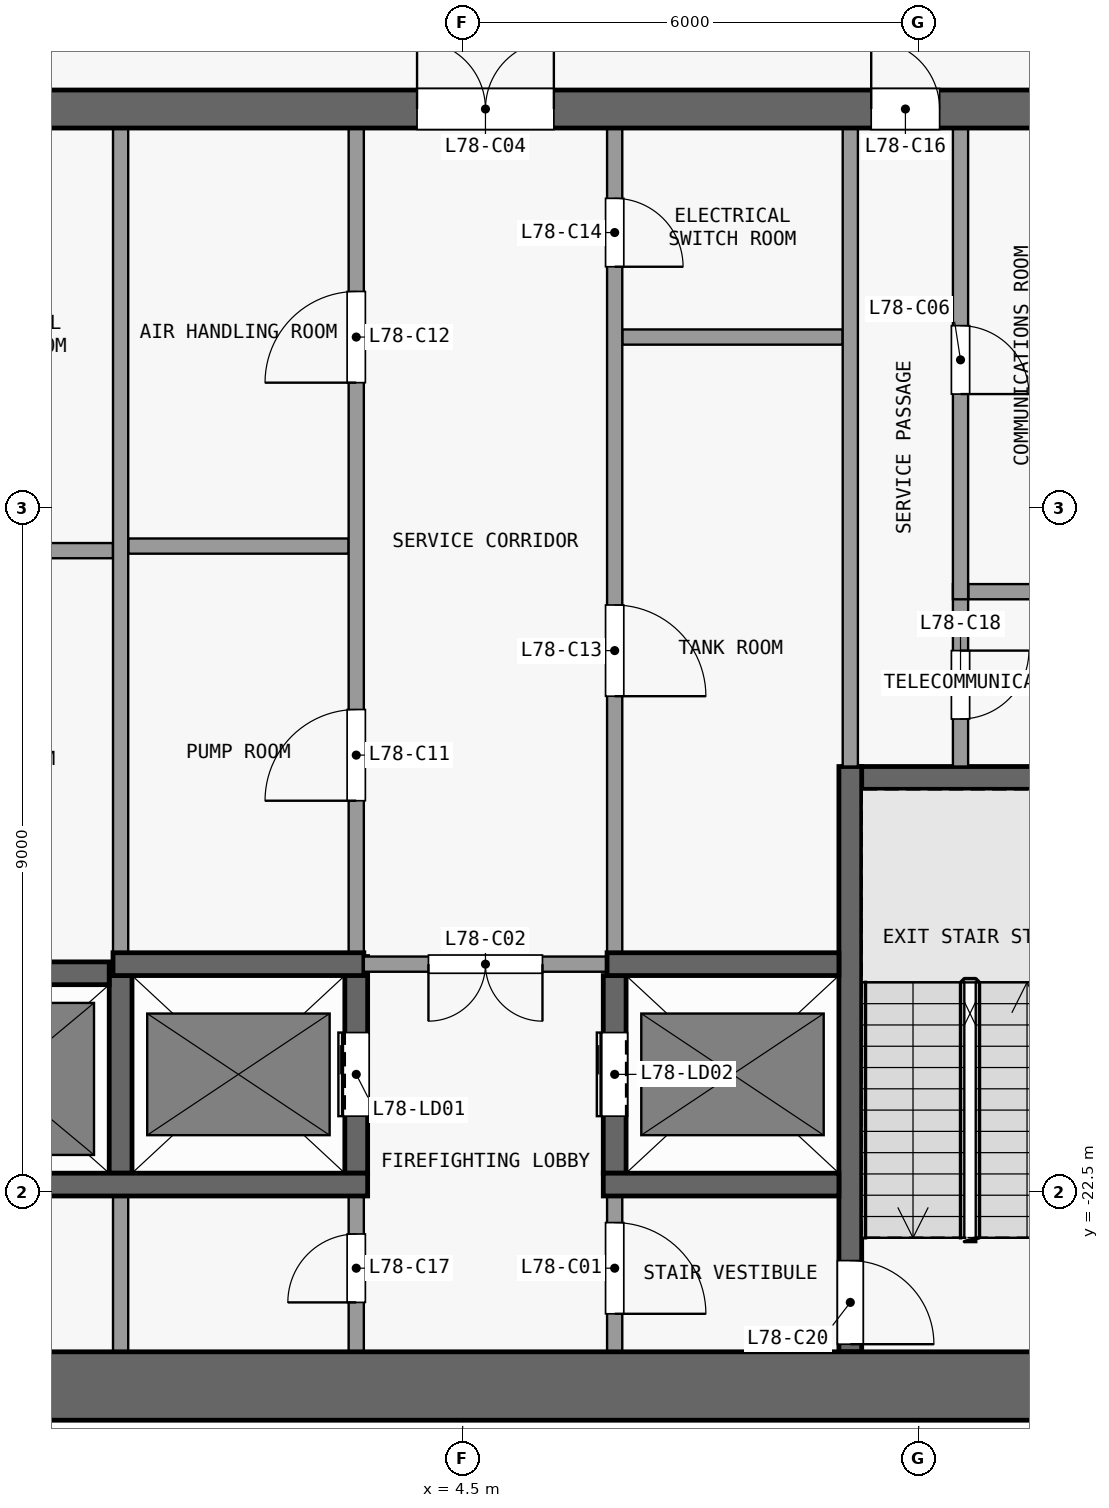
"""IFC4 building model, lengths in metres.
Left out: names, types, materials, properties, quantities, classifications, styles, units other than length and angle.
Written with IfcOpenShell. Run it as: python <this file> out.ifc"""

import sys

from ifc_helpers import new_model, si_unit, direction, frame, frame_2d, origin, place, context, subcontext, project, spatial, rectangle, extrude, element, fill, save


model = new_model("IFC4")
c1 = context("Model", 3, precision=1e-05, world=origin(), true_north=direction((0.0, 1.0)))
c2 = subcontext(c1, "Body", "Model", "MODEL_VIEW")
j1 = project(units=[si_unit("LENGTHUNIT", "METRE"), si_unit("PLANEANGLEUNIT", "RADIAN")], contexts=[c1])
p1 = place(None, origin())
s1 = spatial("IfcSite", under=j1, at=p1, CompositionType="ELEMENT")
p2 = place(p1, origin())
s2 = spatial("IfcBuilding", under=s1, at=p2, CompositionType="ELEMENT")
p3 = place(p2, frame((0.0, 0.0, 307.7)))
s3 = spatial("IfcBuildingStorey", under=s2, at=p3, CompositionType="ELEMENT", Elevation=307.7)
p4 = place(p3, frame((-13.1, -25.05, 0.0), z_axis=(0.0, 0.0, 1.0), x_axis=(1.0, 0.0, 0.0)))
e1 = element("IfcWall", 1, at=p4, inside=s3, PredefinedType="SHEAR", context=c2, shape_type="SweptSolid", body=[
    extrude(rectangle(XDim=26.2, YDim=0.9, at=frame_2d((13.1, 0.0))), origin(), (0.0, 0.0, 1.0), 4.1),
])
p5 = place(p3, frame((-13.1, -8.25, 0.0), z_axis=(0.0, 0.0, 1.0), x_axis=(1.0, 0.0, 0.0)))
e2 = element("IfcWall", 2, at=p5, inside=s3, PredefinedType="SHEAR", context=c2, shape_type="SweptSolid", body=[
    extrude(rectangle(XDim=26.2, YDim=0.5, at=frame_2d((13.1, 0.0))), origin(), (0.0, 0.0, 1.0), 4.1),
])
p6 = place(p5, frame((7.4, 0.0, 0.0)))
e3 = element("IfcOpeningElement", 3, at=p6, cuts=e2, PredefinedType="OPENING", context=c2, shape_type="SweptSolid", body=[
    extrude(rectangle(XDim=1.8, YDim=2.1, at=frame_2d((0.9, 1.05))), frame((0.0, 0.26, 0.0), z_axis=(0.0, -1.0, 0.0), x_axis=(1.0, 0.0, 0.0)), (0.0, 0.0, 1.0), 0.52),
])
p7 = place(p5, frame((17.0, 0.0, 0.0)))
e4 = element("IfcOpeningElement", 4, at=p7, cuts=e2, PredefinedType="OPENING", context=c2, shape_type="SweptSolid", body=[
    extrude(rectangle(XDim=1.8, YDim=2.1, at=frame_2d((0.9, 1.05))), frame((0.0, 0.26, 0.0), z_axis=(0.0, -1.0, 0.0), x_axis=(1.0, 0.0, 0.0)), (0.0, 0.0, 1.0), 0.52),
])
p8 = place(p5, frame((1.325, 0.0, 0.0)))
e5 = element("IfcOpeningElement", 5, at=p8, cuts=e2, PredefinedType="OPENING", context=c2, shape_type="SweptSolid", body=[
    extrude(rectangle(XDim=1.2, YDim=2.1, at=frame_2d((0.6, 1.05))), frame((0.0, 0.26, 0.0), z_axis=(0.0, -1.0, 0.0), x_axis=(1.0, 0.0, 0.0)), (0.0, 0.0, 1.0), 0.52),
])
p9 = place(p5, frame((22.975, 0.0, 0.0)))
e6 = element("IfcOpeningElement", 6, at=p9, cuts=e2, PredefinedType="OPENING", context=c2, shape_type="SweptSolid", body=[
    extrude(rectangle(XDim=0.9, YDim=2.1, at=frame_2d((0.45, 1.05))), frame((0.0, 0.26, 0.0), z_axis=(0.0, -1.0, 0.0), x_axis=(1.0, 0.0, 0.0)), (0.0, 0.0, 1.0), 0.52),
])
p10 = place(p3, frame((-3.25, -22.4, 0.0), z_axis=(0.0, 0.0, 1.0), x_axis=(1.0, 0.0, 0.0)))
e7 = element("IfcWall", 7, at=p10, inside=s3, PredefinedType="SHEAR", context=c2, shape_type="SweptSolid", body=[
    extrude(rectangle(XDim=6.5, YDim=0.3, at=frame_2d((3.25, 0.0))), origin(), (0.0, 0.0, 1.0), 4.1),
])
p11 = place(p3, frame((6.35, -22.4, 0.0), z_axis=(0.0, 0.0, 1.0), x_axis=(1.0, 0.0, 0.0)))
e8 = element("IfcWall", 8, at=p11, inside=s3, PredefinedType="SHEAR", context=c2, shape_type="SweptSolid", body=[
    extrude(rectangle(XDim=3.1, YDim=0.3, at=frame_2d((1.55, 0.0))), origin(), (0.0, 0.0, 1.0), 4.1),
])
p12 = place(p3, frame((-3.2, -19.62, 0.0), z_axis=(0.0, 0.0, 1.0), x_axis=(1.0, 0.0, 0.0)))
e9 = element("IfcWall", 9, at=p12, inside=s3, PredefinedType="SHEAR", context=c2, shape_type="SweptSolid", body=[
    extrude(rectangle(XDim=3.05, YDim=0.3, at=frame_2d((1.525, 0.0))), origin(), (0.0, 0.0, 1.0), 4.1),
])
p13 = place(p3, frame((-0.1, -19.5, 0.0), z_axis=(0.0, 0.0, 1.0), x_axis=(1.0, 0.0, 0.0)))
e10 = element("IfcWall", 10, at=p13, inside=s3, PredefinedType="SHEAR", context=c2, shape_type="SweptSolid", body=[
    extrude(rectangle(XDim=3.3, YDim=0.3, at=frame_2d((1.65, 0.0))), origin(), (0.0, 0.0, 1.0), 4.1),
])
p14 = place(p3, frame((6.4, -19.5, 0.0), z_axis=(0.0, 0.0, 1.0), x_axis=(-1.0, 0.0, 0.0)))
e11 = element("IfcWall", 11, at=p14, inside=s3, PredefinedType="PARTITIONING", context=c2, shape_type="SweptSolid", body=[
    extrude(rectangle(XDim=3.2, YDim=0.2, at=frame_2d((1.6, 0.0))), origin(), (0.0, 0.0, 1.0), 4.1),
])
p15 = place(p14, frame((0.85, 0.0, 0.0)))
e12 = element("IfcOpeningElement", 12, at=p15, cuts=e11, PredefinedType="OPENING", context=c2, shape_type="SweptSolid", body=[
    extrude(rectangle(XDim=1.5, YDim=2.1, at=frame_2d((0.75, 1.05))), frame((0.0, 0.11, 0.0), z_axis=(0.0, -1.0, 0.0), x_axis=(1.0, 0.0, 0.0)), (0.0, 0.0, 1.0), 0.22),
])
p16 = place(p3, frame((6.4, -19.5, 0.0), z_axis=(0.0, 0.0, 1.0), x_axis=(1.0, 0.0, 0.0)))
e13 = element("IfcWall", 13, at=p16, inside=s3, PredefinedType="SHEAR", context=c2, shape_type="SweptSolid", body=[
    extrude(rectangle(XDim=3.05, YDim=0.3, at=frame_2d((1.525, 0.0))), origin(), (0.0, 0.0, 1.0), 4.1),
])
p17 = place(p3, frame((9.5, -17.05, 0.0), z_axis=(0.0, 0.0, 1.0), x_axis=(1.0, 0.0, 0.0)))
e14 = element("IfcWall", 14, at=p17, inside=s3, PredefinedType="SHEAR", context=c2, shape_type="SweptSolid", body=[
    extrude(rectangle(XDim=3.1, YDim=0.3, at=frame_2d((1.55, 0.0))), origin(), (0.0, 0.0, 1.0), 4.1),
])
p18 = place(p3, frame((11.15, -14.6, 0.0), z_axis=(0.0, 0.0, 1.0), x_axis=(1.0, 0.0, 0.0)))
e15 = element("IfcWall", 15, at=p18, inside=s3, PredefinedType="PARTITIONING", context=c2, shape_type="SweptSolid", body=[
    extrude(rectangle(XDim=1.45, YDim=0.2, at=frame_2d((0.725, 0.0))), origin(), (0.0, 0.0, 1.0), 4.1),
])
for number, where, z_axis, x_axis in (
    (16, (-3.0, -14.06, 0.0), (0.0, 0.0, 1.0), (1.0, 0.0, 0.0)),
    (17, (0.1, -14.0, 0.0), (0.0, 0.0, 1.0), (1.0, 0.0, 0.0)),
    (18, (6.6, -11.25, 0.0), (0.0, 0.0, 1.0), (1.0, 0.0, 0.0)),
):
    element("IfcWall", number, at=place(p3, frame(where, z_axis=z_axis, x_axis=x_axis)), inside=s3, PredefinedType="PARTITIONING", context=c2, shape_type="SweptSolid", body=[
        extrude(rectangle(XDim=2.9, YDim=0.2, at=frame_2d((1.45, 0.0))), origin(), (0.0, 0.0, 1.0), 4.1),
    ])
p19 = place(p3, frame((0.0, -24.6, 0.0), z_axis=(0.0, 0.0, 1.0), x_axis=(0.0, 1.0, 0.0)))
e19 = element("IfcWall", 19, at=p19, inside=s3, PredefinedType="PARTITIONING", context=c2, shape_type="SweptSolid", body=[
    extrude(rectangle(XDim=2.05, YDim=0.2, at=frame_2d((1.025, 0.0))), origin(), (0.0, 0.0, 1.0), 4.1),
])
p20 = place(p3, frame((0.0, -22.25, 0.0), z_axis=(0.0, 0.0, 1.0), x_axis=(0.0, 1.0, 0.0)))
e20 = element("IfcWall", 20, at=p20, inside=s3, PredefinedType="SHEAR", context=c2, shape_type="SweptSolid", body=[
    extrude(rectangle(XDim=2.6, YDim=0.3, at=frame_2d((1.3, 0.0))), origin(), (0.0, 0.0, 1.0), 4.1),
])
p21 = place(p3, frame((0.0, -19.35, 0.0), z_axis=(0.0, 0.0, 1.0), x_axis=(0.0, 1.0, 0.0)))
e21 = element("IfcWall", 21, at=p21, inside=s3, PredefinedType="PARTITIONING", context=c2, shape_type="SweptSolid", body=[
    extrude(rectangle(XDim=10.85, YDim=0.2, at=frame_2d((5.425, 0.0))), origin(), (0.0, 0.0, 1.0), 4.1),
])
p22 = place(p3, frame((3.1, -24.6, 0.0), z_axis=(0.0, 0.0, 1.0), x_axis=(0.0, 1.0, 0.0)))
e22 = element("IfcWall", 22, at=p22, inside=s3, PredefinedType="PARTITIONING", context=c2, shape_type="SweptSolid", body=[
    extrude(rectangle(XDim=2.05, YDim=0.2, at=frame_2d((1.025, 0.0))), origin(), (0.0, 0.0, 1.0), 4.1),
])
p23 = place(p22, frame((0.65, 0.0, 0.0)))
e23 = element("IfcOpeningElement", 23, at=p23, cuts=e22, PredefinedType="OPENING", context=c2, shape_type="SweptSolid", body=[
    extrude(rectangle(XDim=0.9, YDim=2.1, at=frame_2d((0.45, 1.05))), frame((0.0, 0.11, 0.0), z_axis=(0.0, -1.0, 0.0), x_axis=(1.0, 0.0, 0.0)), (0.0, 0.0, 1.0), 0.22),
])
p24 = place(p3, frame((3.1, -22.25, 0.0), z_axis=(0.0, 0.0, 1.0), x_axis=(0.0, 1.0, 0.0)))
e24 = element("IfcWall", 24, at=p24, inside=s3, PredefinedType="SHEAR", context=c2, shape_type="SweptSolid", body=[
    extrude(rectangle(XDim=2.85, YDim=0.3, at=frame_2d((1.425, 0.0))), origin(), (0.0, 0.0, 1.0), 4.1),
])
p25 = place(p24, frame((0.75, 0.0, 0.0)))
e25 = element("IfcOpeningElement", 25, at=p25, cuts=e24, PredefinedType="OPENING", context=c2, shape_type="SweptSolid", body=[
    extrude(rectangle(XDim=1.1, YDim=2.1, at=frame_2d((0.55, 1.05))), frame((0.0, 0.16, 0.0), z_axis=(0.0, -1.0, 0.0), x_axis=(1.0, 0.0, 0.0)), (0.0, 0.0, 1.0), 0.32),
])
p26 = place(p3, frame((3.1, -19.6, 0.0), z_axis=(0.0, 0.0, 1.0), x_axis=(0.0, 1.0, 0.0)))
e26 = element("IfcWall", 26, at=p26, inside=s3, PredefinedType="PARTITIONING", context=c2, shape_type="SweptSolid", body=[
    extrude(rectangle(XDim=11.1, YDim=0.2, at=frame_2d((5.55, 0.0))), origin(), (0.0, 0.0, 1.0), 4.1),
])
p27 = place(p26, frame((2.25, 0.0, 0.0)))
e27 = element("IfcOpeningElement", 27, at=p27, cuts=e26, PredefinedType="OPENING", context=c2, shape_type="SweptSolid", body=[
    extrude(rectangle(XDim=1.2, YDim=2.1, at=frame_2d((0.6, 1.05))), frame((0.0, 0.11, 0.0), z_axis=(0.0, -1.0, 0.0), x_axis=(1.0, 0.0, 0.0)), (0.0, 0.0, 1.0), 0.22),
])
p28 = place(p26, frame((7.75, 0.0, 0.0)))
e28 = element("IfcOpeningElement", 28, at=p28, cuts=e26, PredefinedType="OPENING", context=c2, shape_type="SweptSolid", body=[
    extrude(rectangle(XDim=1.2, YDim=2.1, at=frame_2d((0.6, 1.05))), frame((0.0, 0.11, 0.0), z_axis=(0.0, -1.0, 0.0), x_axis=(1.0, 0.0, 0.0)), (0.0, 0.0, 1.0), 0.22),
])
p29 = place(p3, frame((6.5, -22.55, 0.0), z_axis=(0.0, 0.0, 1.0), x_axis=(0.0, -1.0, 0.0)))
e29 = element("IfcWall", 29, at=p29, inside=s3, PredefinedType="PARTITIONING", context=c2, shape_type="SweptSolid", body=[
    extrude(rectangle(XDim=2.05, YDim=0.2, at=frame_2d((1.025, 0.0))), origin(), (0.0, 0.0, 1.0), 4.1),
])
p30 = place(p29, frame((0.35, 0.0, 0.0)))
e30 = element("IfcOpeningElement", 30, at=p30, cuts=e29, PredefinedType="OPENING", context=c2, shape_type="SweptSolid", body=[
    extrude(rectangle(XDim=1.2, YDim=2.1, at=frame_2d((0.6, 1.05))), frame((0.0, 0.11, 0.0), z_axis=(0.0, -1.0, 0.0), x_axis=(1.0, 0.0, 0.0)), (0.0, 0.0, 1.0), 0.22),
])
p31 = place(p3, frame((6.5, -22.25, 0.0), z_axis=(0.0, 0.0, 1.0), x_axis=(0.0, 1.0, 0.0)))
e31 = element("IfcWall", 31, at=p31, inside=s3, PredefinedType="SHEAR", context=c2, shape_type="SweptSolid", body=[
    extrude(rectangle(XDim=2.6, YDim=0.3, at=frame_2d((1.3, 0.0))), origin(), (0.0, 0.0, 1.0), 4.1),
])
p32 = place(p31, frame((0.75, 0.0, 0.0)))
e32 = element("IfcOpeningElement", 32, at=p32, cuts=e31, PredefinedType="OPENING", context=c2, shape_type="SweptSolid", body=[
    extrude(rectangle(XDim=1.1, YDim=2.1, at=frame_2d((0.55, 1.05))), frame((0.0, 0.16, 0.0), z_axis=(0.0, -1.0, 0.0), x_axis=(1.0, 0.0, 0.0)), (0.0, 0.0, 1.0), 0.32),
])
p33 = place(p3, frame((6.5, -8.5, 0.0), z_axis=(0.0, 0.0, 1.0), x_axis=(0.0, -1.0, 0.0)))
e33 = element("IfcWall", 33, at=p33, inside=s3, PredefinedType="PARTITIONING", context=c2, shape_type="SweptSolid", body=[
    extrude(rectangle(XDim=10.85, YDim=0.2, at=frame_2d((5.425, 0.0))), origin(), (0.0, 0.0, 1.0), 4.1),
])
p34 = place(p33, frame((6.275, 0.0, 0.0)))
e34 = element("IfcOpeningElement", 34, at=p34, cuts=e33, PredefinedType="OPENING", context=c2, shape_type="SweptSolid", body=[
    extrude(rectangle(XDim=1.2, YDim=2.1, at=frame_2d((0.6, 1.05))), frame((0.0, 0.11, 0.0), z_axis=(0.0, -1.0, 0.0), x_axis=(1.0, 0.0, 0.0)), (0.0, 0.0, 1.0), 0.22),
])
p35 = place(p33, frame((0.925, 0.0, 0.0)))
e35 = element("IfcOpeningElement", 35, at=p35, cuts=e33, PredefinedType="OPENING", context=c2, shape_type="SweptSolid", body=[
    extrude(rectangle(XDim=0.9, YDim=2.1, at=frame_2d((0.45, 1.05))), frame((0.0, 0.11, 0.0), z_axis=(0.0, -1.0, 0.0), x_axis=(1.0, 0.0, 0.0)), (0.0, 0.0, 1.0), 0.22),
])
p36 = place(p3, frame((9.6, -16.9, 0.0), z_axis=(0.0, 0.0, 1.0), x_axis=(0.0, -1.0, 0.0)))
e36 = element("IfcWall", 36, at=p36, inside=s3, PredefinedType="SHEAR", context=c2, shape_type="SweptSolid", body=[
    extrude(rectangle(XDim=7.7, YDim=0.3, at=frame_2d((3.85, 0.0))), origin(), (0.0, 0.0, 1.0), 4.1),
])
p37 = place(p36, frame((6.5, 0.0, 0.0)))
e37 = element("IfcOpeningElement", 37, at=p37, cuts=e36, PredefinedType="OPENING", context=c2, shape_type="SweptSolid", body=[
    extrude(rectangle(XDim=1.1, YDim=2.1, at=frame_2d((0.55, 1.05))), frame((0.0, 0.16, 0.0), z_axis=(0.0, -1.0, 0.0), x_axis=(1.0, 0.0, 0.0)), (0.0, 0.0, 1.0), 0.32),
])
p38 = place(p3, frame((9.6, -16.9, 0.0), z_axis=(0.0, 0.0, 1.0), x_axis=(0.0, 1.0, 0.0)))
e38 = element("IfcWall", 38, at=p38, inside=s3, PredefinedType="PARTITIONING", context=c2, shape_type="SweptSolid", body=[
    extrude(rectangle(XDim=8.4, YDim=0.2, at=frame_2d((4.2, 0.0))), origin(), (0.0, 0.0, 1.0), 4.1),
])
p39 = place(p3, frame((11.05, -14.5, 0.0), z_axis=(0.0, 0.0, 1.0), x_axis=(0.0, -1.0, 0.0)))
e39 = element("IfcWall", 39, at=p39, inside=s3, PredefinedType="PARTITIONING", context=c2, shape_type="SweptSolid", body=[
    extrude(rectangle(XDim=2.4, YDim=0.2, at=frame_2d((1.2, 0.0))), origin(), (0.0, 0.0, 1.0), 4.1),
])
p40 = place(p39, frame((0.875, 0.0, 0.0)))
e40 = element("IfcOpeningElement", 40, at=p40, cuts=e39, PredefinedType="OPENING", context=c2, shape_type="SweptSolid", body=[
    extrude(rectangle(XDim=0.9, YDim=2.1, at=frame_2d((0.45, 1.05))), frame((0.0, 0.11, 0.0), z_axis=(0.0, -1.0, 0.0), x_axis=(1.0, 0.0, 0.0)), (0.0, 0.0, 1.0), 0.22),
])
p41 = place(p3, frame((11.05, -8.5, 0.0), z_axis=(0.0, 0.0, 1.0), x_axis=(0.0, -1.0, 0.0)))
e41 = element("IfcWall", 41, at=p41, inside=s3, PredefinedType="PARTITIONING", context=c2, shape_type="SweptSolid", body=[
    extrude(rectangle(XDim=6.2, YDim=0.2, at=frame_2d((3.1, 0.0))), origin(), (0.0, 0.0, 1.0), 4.1),
])
p42 = place(p41, frame((2.6, 0.0, 0.0)))
e42 = element("IfcOpeningElement", 42, at=p42, cuts=e41, PredefinedType="OPENING", context=c2, shape_type="SweptSolid", body=[
    extrude(rectangle(XDim=0.9, YDim=2.1, at=frame_2d((0.45, 1.05))), frame((0.0, 0.11, 0.0), z_axis=(0.0, -1.0, 0.0), x_axis=(1.0, 0.0, 0.0)), (0.0, 0.0, 1.0), 0.22),
])
p43 = place(p25, origin())
e43 = element("IfcDoor", 43, at=p43, inside=s3, OperationType="DOUBLE_DOOR_SLIDING", PredefinedType="DOOR", context=c2, shape_type="SweptSolid", body=[
    extrude(rectangle(XDim=1.1, YDim=2.1, at=frame_2d((0.55, 1.05))), frame((0.0, 0.025, 0.0), z_axis=(0.0, -1.0, 0.0), x_axis=(1.0, 0.0, 0.0)), (0.0, 0.0, 1.0), 0.05),
])
fill(e25, e43)
p44 = place(p32, origin())
e44 = element("IfcDoor", 44, at=p44, inside=s3, OperationType="DOUBLE_DOOR_SLIDING", PredefinedType="DOOR", context=c2, shape_type="SweptSolid", body=[
    extrude(rectangle(XDim=1.1, YDim=2.1, at=frame_2d((0.55, 1.05))), frame((0.0, 0.025, 0.0), z_axis=(0.0, -1.0, 0.0), x_axis=(1.0, 0.0, 0.0)), (0.0, 0.0, 1.0), 0.05),
])
fill(e32, e44)
p45 = place(p30, origin())
e45 = element("IfcDoor", 45, at=p45, inside=s3, OperationType="SINGLE_SWING_RIGHT", PredefinedType="DOOR", context=c2, shape_type="SweptSolid", body=[
    extrude(rectangle(XDim=1.2, YDim=2.1, at=frame_2d((0.6, 1.05))), frame((0.0, 0.025, 0.0), z_axis=(0.0, -1.0, 0.0), x_axis=(1.0, 0.0, 0.0)), (0.0, 0.0, 1.0), 0.05),
])
fill(e30, e45)
p46 = place(p15, origin())
e46 = element("IfcDoor", 46, at=p46, inside=s3, OperationType="DOUBLE_DOOR_SINGLE_SWING", PredefinedType="DOOR", context=c2, shape_type="SweptSolid", body=[
    extrude(rectangle(XDim=1.5, YDim=2.1, at=frame_2d((0.75, 1.05))), frame((0.0, 0.025, 0.0), z_axis=(0.0, -1.0, 0.0), x_axis=(1.0, 0.0, 0.0)), (0.0, 0.0, 1.0), 0.05),
])
fill(e12, e46)
p47 = place(p7, origin())
e47 = element("IfcDoor", 47, at=p47, inside=s3, OperationType="DOUBLE_DOOR_SINGLE_SWING", PredefinedType="DOOR", context=c2, shape_type="SweptSolid", body=[
    extrude(rectangle(XDim=1.8, YDim=2.1, at=frame_2d((0.9, 1.05))), frame((0.0, 0.025, 0.0), z_axis=(0.0, -1.0, 0.0), x_axis=(1.0, 0.0, 0.0)), (0.0, 0.0, 1.0), 0.05),
])
fill(e4, e47)
p48 = place(p42, origin())
e48 = element("IfcDoor", 48, at=p48, inside=s3, OperationType="SINGLE_SWING_RIGHT", PredefinedType="DOOR", context=c2, shape_type="SweptSolid", body=[
    extrude(rectangle(XDim=0.9, YDim=2.1, at=frame_2d((0.45, 1.05))), frame((0.0, 0.025, 0.0), z_axis=(0.0, -1.0, 0.0), x_axis=(1.0, 0.0, 0.0)), (0.0, 0.0, 1.0), 0.05),
])
fill(e42, e48)
p49 = place(p27, origin())
e49 = element("IfcDoor", 49, at=p49, inside=s3, OperationType="SINGLE_SWING_LEFT", PredefinedType="DOOR", context=c2, shape_type="SweptSolid", body=[
    extrude(rectangle(XDim=1.2, YDim=2.1, at=frame_2d((0.6, 1.05))), frame((0.0, 0.025, 0.0), z_axis=(0.0, -1.0, 0.0), x_axis=(1.0, 0.0, 0.0)), (0.0, 0.0, 1.0), 0.05),
])
fill(e27, e49)
p50 = place(p28, origin())
e50 = element("IfcDoor", 50, at=p50, inside=s3, OperationType="SINGLE_SWING_LEFT", PredefinedType="DOOR", context=c2, shape_type="SweptSolid", body=[
    extrude(rectangle(XDim=1.2, YDim=2.1, at=frame_2d((0.6, 1.05))), frame((0.0, 0.025, 0.0), z_axis=(0.0, -1.0, 0.0), x_axis=(1.0, 0.0, 0.0)), (0.0, 0.0, 1.0), 0.05),
])
fill(e28, e50)
p51 = place(p34, origin())
e51 = element("IfcDoor", 51, at=p51, inside=s3, OperationType="SINGLE_SWING_RIGHT", PredefinedType="DOOR", context=c2, shape_type="SweptSolid", body=[
    extrude(rectangle(XDim=1.2, YDim=2.1, at=frame_2d((0.6, 1.05))), frame((0.0, 0.025, 0.0), z_axis=(0.0, -1.0, 0.0), x_axis=(1.0, 0.0, 0.0)), (0.0, 0.0, 1.0), 0.05),
])
fill(e34, e51)
p52 = place(p35, origin())
e52 = element("IfcDoor", 52, at=p52, inside=s3, OperationType="SINGLE_SWING_RIGHT", PredefinedType="DOOR", context=c2, shape_type="SweptSolid", body=[
    extrude(rectangle(XDim=0.9, YDim=2.1, at=frame_2d((0.45, 1.05))), frame((0.0, 0.025, 0.0), z_axis=(0.0, -1.0, 0.0), x_axis=(1.0, 0.0, 0.0)), (0.0, 0.0, 1.0), 0.05),
])
fill(e35, e52)
p53 = place(p9, origin())
e53 = element("IfcDoor", 53, at=p53, inside=s3, OperationType="SINGLE_SWING_LEFT", PredefinedType="DOOR", context=c2, shape_type="SweptSolid", body=[
    extrude(rectangle(XDim=0.9, YDim=2.1, at=frame_2d((0.45, 1.05))), frame((0.0, 0.025, 0.0), z_axis=(0.0, -1.0, 0.0), x_axis=(1.0, 0.0, 0.0)), (0.0, 0.0, 1.0), 0.05),
])
fill(e6, e53)
p54 = place(p23, origin())
e54 = element("IfcDoor", 54, at=p54, inside=s3, OperationType="SINGLE_SWING_LEFT", PredefinedType="DOOR", context=c2, shape_type="SweptSolid", body=[
    extrude(rectangle(XDim=0.9, YDim=2.1, at=frame_2d((0.45, 1.05))), frame((0.0, 0.025, 0.0), z_axis=(0.0, -1.0, 0.0), x_axis=(1.0, 0.0, 0.0)), (0.0, 0.0, 1.0), 0.05),
])
fill(e23, e54)
p55 = place(p40, origin())
e55 = element("IfcDoor", 55, at=p55, inside=s3, OperationType="SINGLE_SWING_LEFT", PredefinedType="DOOR", context=c2, shape_type="SweptSolid", body=[
    extrude(rectangle(XDim=0.9, YDim=2.1, at=frame_2d((0.45, 1.05))), frame((0.0, 0.025, 0.0), z_axis=(0.0, -1.0, 0.0), x_axis=(1.0, 0.0, 0.0)), (0.0, 0.0, 1.0), 0.05),
])
fill(e40, e55)
p56 = place(p37, origin())
e56 = element("IfcDoor", 56, at=p56, inside=s3, OperationType="SINGLE_SWING_RIGHT", PredefinedType="DOOR", context=c2, shape_type="SweptSolid", body=[
    extrude(rectangle(XDim=1.1, YDim=2.1, at=frame_2d((0.55, 1.05))), frame((0.0, 0.025, 0.0), z_axis=(0.0, -1.0, 0.0), x_axis=(1.0, 0.0, 0.0)), (0.0, 0.0, 1.0), 0.05),
])
fill(e37, e56)
save(model, sys.argv[1])
